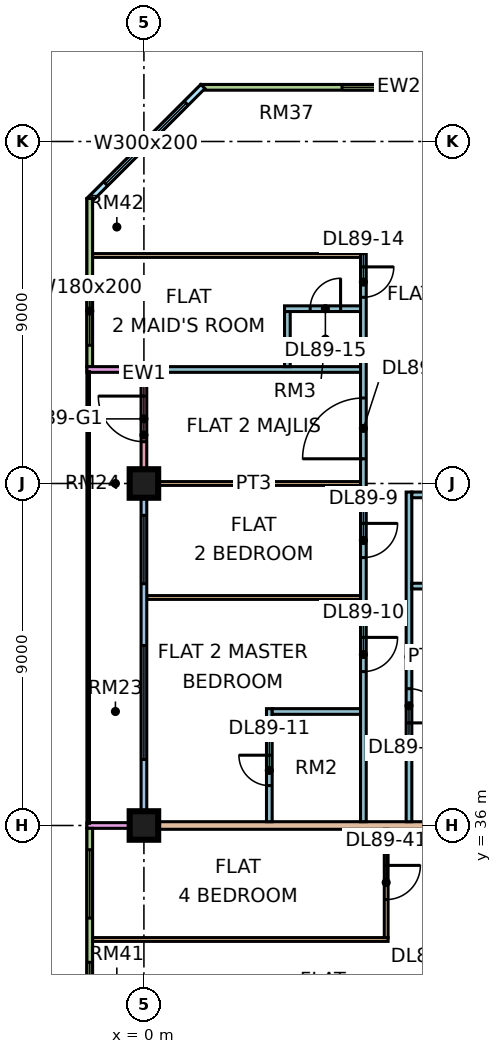
"""IFC4 building model, lengths in metres.
Left out: names, types, materials, properties, quantities, classifications, styles, units other than length and angle.
Written with IfcOpenShell. Run it as: python <this file> out.ifc"""

import sys

from ifc_helpers import new_model, si_unit, direction, frame, frame_2d, origin, origin_2d, place, context, subcontext, project, spatial, rectangle, extrude, element, fill, save


model = new_model("IFC4")
c1 = context("Model", 3, precision=1e-05, world=origin(), true_north=direction((0.0, 1.0)))
c2 = subcontext(c1, "Body", "Model", "MODEL_VIEW")
j1 = project(units=[si_unit("LENGTHUNIT", "METRE"), si_unit("PLANEANGLEUNIT", "RADIAN")], contexts=[c1])
p1 = place(None, origin())
s1 = spatial("IfcSite", under=j1, at=p1, CompositionType="ELEMENT")
p2 = place(p1, origin())
s2 = spatial("IfcBuilding", under=s1, at=p2, CompositionType="ELEMENT")
p3 = place(p2, frame((0.0, 0.0, 380.15)))
s3 = spatial("IfcBuildingStorey", under=s2, at=p3, CompositionType="ELEMENT", Elevation=380.15)
p4 = place(p3, frame((0.0, 36.0, 0.0), z_axis=(0.0, 0.0, 1.0), x_axis=(1.0, 0.0, 0.0)))
e1 = element("IfcColumn", 1, at=p4, inside=s3, PredefinedType="COLUMN", context=c2, shape_type="SweptSolid", body=[
    extrude(rectangle(XDim=0.75, YDim=0.75, at=origin_2d()), origin(), (0.0, 0.0, 1.0), 3.75),
])
p5 = place(p3, frame((0.0, 45.0, 0.0), z_axis=(0.0, 0.0, 1.0), x_axis=(1.0, 0.0, 0.0)))
e2 = element("IfcColumn", 2, at=p5, inside=s3, PredefinedType="COLUMN", context=c2, shape_type="SweptSolid", body=[
    extrude(rectangle(XDim=0.75, YDim=0.75, at=origin_2d()), origin(), (0.0, 0.0, 1.0), 3.75),
])
p6 = place(p3, frame((11.925, 55.425, 0.0), z_axis=(0.0, 0.0, 1.0), x_axis=(-1.0, 0.0, 0.0)))
e3 = element("IfcWall", 3, at=p6, inside=s3, PredefinedType="SOLIDWALL", context=c2, shape_type="SweptSolid", body=[
    extrude(rectangle(XDim=10.425, YDim=0.15, at=frame_2d((5.212, 0.0))), origin(), (0.0, 0.0, 1.0), 3.3),
])
p7 = place(p6, frame((3.712, 0.0, 0.45)))
e4 = element("IfcOpeningElement", 4, at=p7, cuts=e3, PredefinedType="OPENING", context=c2, shape_type="SweptSolid", body=[
    extrude(rectangle(XDim=3.0, YDim=2.0, at=frame_2d((1.5, 1.0))), frame((0.0, 0.085, 0.0), z_axis=(0.0, -1.0, 0.0), x_axis=(1.0, 0.0, 0.0)), (0.0, 0.0, 1.0), 0.17),
])
p8 = place(p3, frame((1.553, 55.447, 0.0), z_axis=(0.0, 0.0, 1.0), x_axis=(-0.707106781187, -0.707106781187, 0.0)))
e5 = element("IfcWall", 5, at=p8, inside=s3, PredefinedType="SOLIDWALL", context=c2, shape_type="SweptSolid", body=[
    extrude(rectangle(XDim=4.243, YDim=0.15, at=frame_2d((2.121, 0.0))), origin(), (0.0, 0.0, 1.0), 3.3),
])
p9 = place(p8, frame((0.621, 0.0, 0.45)))
e6 = element("IfcOpeningElement", 6, at=p9, cuts=e5, PredefinedType="OPENING", context=c2, shape_type="SweptSolid", body=[
    extrude(rectangle(XDim=3.0, YDim=2.0, at=frame_2d((1.5, 1.0))), frame((0.0, 0.085, 0.0), z_axis=(0.0, -1.0, 0.0), x_axis=(1.0, 0.0, 0.0)), (0.0, 0.0, 1.0), 0.17),
])
p10 = place(p3, frame((-1.425, 52.5, 0.0), z_axis=(0.0, 0.0, 1.0), x_axis=(0.0, -1.0, 0.0)))
e7 = element("IfcWall", 7, at=p10, inside=s3, PredefinedType="SOLIDWALL", context=c2, shape_type="SweptSolid", body=[
    extrude(rectangle(XDim=4.425, YDim=0.15, at=frame_2d((2.212, 0.0))), origin(), (0.0, 0.0, 1.0), 3.3),
])
p11 = place(p10, frame((2.062, 0.0, 0.45)))
e8 = element("IfcOpeningElement", 8, at=p11, cuts=e7, PredefinedType="OPENING", context=c2, shape_type="SweptSolid", body=[
    extrude(rectangle(XDim=1.8, YDim=2.0, at=frame_2d((0.9, 1.0))), frame((0.0, 0.085, 0.0), z_axis=(0.0, -1.0, 0.0), x_axis=(1.0, 0.0, 0.0)), (0.0, 0.0, 1.0), 0.17),
])
for number, where, z_axis, x_axis in (
    (9, (-1.5, 48.0, 0.0), (0.0, 0.0, 1.0), (1.0, 0.0, 0.0)),
    (10, (-1.5, 36.0, 0.0), (0.0, 0.0, 1.0), (1.0, 0.0, 0.0)),
):
    element("IfcWall", number, at=place(p3, frame(where, z_axis=z_axis, x_axis=x_axis)), inside=s3, PredefinedType="SOLIDWALL", context=c2, shape_type="SweptSolid", body=[
        extrude(rectangle(XDim=1.5, YDim=0.15, at=frame_2d((0.75, 0.0))), origin(), (0.0, 0.0, 1.0), 3.3),
    ])
p12 = place(p3, frame((-1.425, 35.925, 0.0), z_axis=(0.0, 0.0, 1.0), x_axis=(0.0, -1.0, 0.0)))
e11 = element("IfcWall", 11, at=p12, inside=s3, PredefinedType="SOLIDWALL", context=c2, shape_type="SweptSolid", body=[
    extrude(rectangle(XDim=11.85, YDim=0.15, at=frame_2d((5.925, 0.0))), origin(), (0.0, 0.0, 1.0), 3.3),
])
p13 = place(p12, frame((0.562, 0.0, 0.45)))
e12 = element("IfcOpeningElement", 12, at=p13, cuts=e11, PredefinedType="OPENING", context=c2, shape_type="SweptSolid", body=[
    extrude(rectangle(XDim=1.8, YDim=2.0, at=frame_2d((0.9, 1.0))), frame((0.0, 0.085, 0.0), z_axis=(0.0, -1.0, 0.0), x_axis=(1.0, 0.0, 0.0)), (0.0, 0.0, 1.0), 0.17),
])
p14 = place(p12, frame((3.525, 0.0, 0.45)))
e13 = element("IfcOpeningElement", 13, at=p14, cuts=e11, PredefinedType="OPENING", context=c2, shape_type="SweptSolid", body=[
    extrude(rectangle(XDim=1.8, YDim=2.0, at=frame_2d((0.9, 1.0))), frame((0.0, 0.085, 0.0), z_axis=(0.0, -1.0, 0.0), x_axis=(1.0, 0.0, 0.0)), (0.0, 0.0, 1.0), 0.17),
])
p15 = place(p12, frame((6.525, 0.0, 0.45)))
e14 = element("IfcOpeningElement", 14, at=p15, cuts=e11, PredefinedType="OPENING", context=c2, shape_type="SweptSolid", body=[
    extrude(rectangle(XDim=1.8, YDim=2.0, at=frame_2d((0.9, 1.0))), frame((0.0, 0.085, 0.0), z_axis=(0.0, -1.0, 0.0), x_axis=(1.0, 0.0, 0.0)), (0.0, 0.0, 1.0), 0.17),
])
p16 = place(p12, frame((9.488, 0.0, 0.45)))
e15 = element("IfcOpeningElement", 15, at=p16, cuts=e11, PredefinedType="OPENING", context=c2, shape_type="SweptSolid", body=[
    extrude(rectangle(XDim=1.8, YDim=2.0, at=frame_2d((0.9, 1.0))), frame((0.0, 0.085, 0.0), z_axis=(0.0, -1.0, 0.0), x_axis=(1.0, 0.0, 0.0)), (0.0, 0.0, 1.0), 0.17),
])
p17 = place(p3, frame((-1.35, 33.0, 0.0), z_axis=(0.0, 0.0, 1.0), x_axis=(1.0, 0.0, 0.0)))
e16 = element("IfcWall", 16, at=p17, inside=s3, PredefinedType="PARTITIONING", context=c2, shape_type="SweptSolid", body=[
    extrude(rectangle(XDim=7.775, YDim=0.1, at=frame_2d((3.888, 0.0))), origin(), (0.0, 0.0, 1.0), 3.3),
])
e17 = element("IfcWall", 17, at=p4, inside=s3, PredefinedType="PARTITIONING", context=c2, shape_type="SweptSolid", body=[
    extrude(rectangle(XDim=12.275, YDim=0.2, at=frame_2d((6.137, 0.0))), origin(), (0.0, 0.0, 1.0), 3.3),
])
p18 = place(p3, frame((0.0, 48.0, 0.0), z_axis=(0.0, 0.0, 1.0), x_axis=(1.0, 0.0, 0.0)))
e18 = element("IfcWall", 18, at=p18, inside=s3, PredefinedType="PARTITIONING", context=c2, shape_type="SweptSolid", body=[
    extrude(rectangle(XDim=5.7, YDim=0.15, at=frame_2d((2.85, 0.0))), origin(), (0.0, 0.0, 1.0), 3.3),
])
p19 = place(p3, frame((-1.35, 51.0, 0.0), z_axis=(0.0, 0.0, 1.0), x_axis=(1.0, 0.0, 0.0)))
e19 = element("IfcWall", 19, at=p19, inside=s3, PredefinedType="PARTITIONING", context=c2, shape_type="SweptSolid", body=[
    extrude(rectangle(XDim=7.05, YDim=0.1, at=frame_2d((3.525, 0.0))), origin(), (0.0, 0.0, 1.0), 3.3),
])
for number, where, z_axis, x_axis in (
    (20, (0.074, 42.0, 0.0), (0.0, 0.0, 1.0), (1.0, 0.0, 0.0)),
    (21, (0.074, 45.0, 0.0), (0.0, 0.0, 1.0), (1.0, 0.0, 0.0)),
):
    element("IfcWall", number, at=place(p3, frame(where, z_axis=z_axis, x_axis=x_axis)), inside=s3, PredefinedType="PARTITIONING", context=c2, shape_type="SweptSolid", body=[
        extrude(rectangle(XDim=5.626, YDim=0.1, at=frame_2d((2.813, 0.0))), origin(), (0.0, 0.0, 1.0), 3.3),
    ])
p20 = place(p3, frame((3.3, 36.1, 0.0), z_axis=(0.0, 0.0, 1.0), x_axis=(0.0, 1.0, 0.0)))
e22 = element("IfcWall", 22, at=p20, inside=s3, PredefinedType="PARTITIONING", context=c2, shape_type="SweptSolid", body=[
    extrude(rectangle(XDim=2.975, YDim=0.15, at=frame_2d((1.487, 0.0))), origin(), (0.0, 0.0, 1.0), 3.3),
])
p21 = place(p20, frame((0.95, 0.0, 0.0)))
e23 = element("IfcOpeningElement", 23, at=p21, cuts=e22, PredefinedType="OPENING", context=c2, shape_type="SweptSolid", body=[
    extrude(rectangle(XDim=0.8, YDim=2.1, at=frame_2d((0.4, 1.05))), frame((0.0, 0.085, 0.0), z_axis=(0.0, -1.0, 0.0), x_axis=(1.0, 0.0, 0.0)), (0.0, 0.0, 1.0), 0.17),
])
p22 = place(p3, frame((3.375, 39.0, 0.0), z_axis=(0.0, 0.0, 1.0), x_axis=(1.0, 0.0, 0.0)))
e24 = element("IfcWall", 24, at=p22, inside=s3, PredefinedType="PARTITIONING", context=c2, shape_type="SweptSolid", body=[
    extrude(rectangle(XDim=2.325, YDim=0.15, at=frame_2d((1.163, 0.0))), origin(), (0.0, 0.0, 1.0), 3.3),
])
p23 = place(p3, frame((3.7, 49.6, 0.0), z_axis=(0.0, 0.0, 1.0), x_axis=(1.0, 0.0, 0.0)))
e25 = element("IfcWall", 25, at=p23, inside=s3, PredefinedType="PARTITIONING", context=c2, shape_type="SweptSolid", body=[
    extrude(rectangle(XDim=2.0, YDim=0.15, at=frame_2d((1.0, 0.0))), origin(), (0.0, 0.0, 1.0), 3.3),
])
p24 = place(p23, frame((0.675, 0.0, 0.0)))
e26 = element("IfcOpeningElement", 26, at=p24, cuts=e25, PredefinedType="OPENING", context=c2, shape_type="SweptSolid", body=[
    extrude(rectangle(XDim=0.8, YDim=2.1, at=frame_2d((0.4, 1.05))), frame((0.0, 0.085, 0.0), z_axis=(0.0, -1.0, 0.0), x_axis=(1.0, 0.0, 0.0)), (0.0, 0.0, 1.0), 0.17),
])
p25 = place(p3, frame((3.775, 48.075, 0.0), z_axis=(0.0, 0.0, 1.0), x_axis=(0.0, 1.0, 0.0)))
e27 = element("IfcWall", 27, at=p25, inside=s3, PredefinedType="PARTITIONING", context=c2, shape_type="SweptSolid", body=[
    extrude(rectangle(XDim=1.45, YDim=0.15, at=frame_2d((0.725, 0.0))), origin(), (0.0, 0.0, 1.0), 3.3),
])
p26 = place(p3, frame((5.775, 36.1, 0.0), z_axis=(0.0, 0.0, 1.0), x_axis=(0.0, 1.0, 0.0)))
e28 = element("IfcWall", 28, at=p26, inside=s3, PredefinedType="PARTITIONING", context=c2, shape_type="SweptSolid", body=[
    extrude(rectangle(XDim=14.95, YDim=0.15, at=frame_2d((7.475, 0.0))), origin(), (0.0, 0.0, 1.0), 3.3),
])
p27 = place(p26, frame((6.95, 0.0, 0.0)))
e29 = element("IfcOpeningElement", 29, at=p27, cuts=e28, PredefinedType="OPENING", context=c2, shape_type="SweptSolid", body=[
    extrude(rectangle(XDim=0.9, YDim=2.1, at=frame_2d((0.45, 1.05))), frame((0.0, 0.085, 0.0), z_axis=(0.0, -1.0, 0.0), x_axis=(1.0, 0.0, 0.0)), (0.0, 0.0, 1.0), 0.17),
])
p28 = place(p26, frame((3.95, 0.0, 0.0)))
e30 = element("IfcOpeningElement", 30, at=p28, cuts=e28, PredefinedType="OPENING", context=c2, shape_type="SweptSolid", body=[
    extrude(rectangle(XDim=0.9, YDim=2.1, at=frame_2d((0.45, 1.05))), frame((0.0, 0.085, 0.0), z_axis=(0.0, -1.0, 0.0), x_axis=(1.0, 0.0, 0.0)), (0.0, 0.0, 1.0), 0.17),
])
p29 = place(p26, frame((13.8, 0.0, 0.0)))
e31 = element("IfcOpeningElement", 31, at=p29, cuts=e28, PredefinedType="OPENING", context=c2, shape_type="SweptSolid", body=[
    extrude(rectangle(XDim=0.8, YDim=2.1, at=frame_2d((0.4, 1.05))), frame((0.0, 0.085, 0.0), z_axis=(0.0, -1.0, 0.0), x_axis=(1.0, 0.0, 0.0)), (0.0, 0.0, 1.0), 0.17),
])
p30 = place(p26, frame((9.55, 0.0, 0.0)))
e32 = element("IfcOpeningElement", 32, at=p30, cuts=e28, PredefinedType="OPENING", context=c2, shape_type="SweptSolid", body=[
    extrude(rectangle(XDim=1.6, YDim=2.1, at=frame_2d((0.8, 1.05))), frame((0.0, 0.085, 0.0), z_axis=(0.0, -1.0, 0.0), x_axis=(1.0, 0.0, 0.0)), (0.0, 0.0, 1.0), 0.17),
])
p31 = place(p3, frame((6.375, 33.05, 0.0), z_axis=(0.0, 0.0, 1.0), x_axis=(0.0, 1.0, 0.0)))
e33 = element("IfcWall", 33, at=p31, inside=s3, PredefinedType="PARTITIONING", context=c2, shape_type="SweptSolid", body=[
    extrude(rectangle(XDim=2.85, YDim=0.1, at=frame_2d((1.425, 0.0))), origin(), (0.0, 0.0, 1.0), 3.3),
])
p32 = place(p31, frame((1.0, 0.0, 0.0)))
e34 = element("IfcOpeningElement", 34, at=p32, cuts=e33, PredefinedType="OPENING", context=c2, shape_type="SweptSolid", body=[
    extrude(rectangle(XDim=0.9, YDim=2.1, at=frame_2d((0.45, 1.05))), frame((0.0, 0.06, 0.0), z_axis=(0.0, -1.0, 0.0), x_axis=(1.0, 0.0, 0.0)), (0.0, 0.0, 1.0), 0.12),
])
p33 = place(p3, frame((6.975, 36.1, 0.0), z_axis=(0.0, 0.0, 1.0), x_axis=(0.0, 1.0, 0.0)))
e35 = element("IfcWall", 35, at=p33, inside=s3, PredefinedType="PARTITIONING", context=c2, shape_type="SweptSolid", body=[
    extrude(rectangle(XDim=8.675, YDim=0.15, at=frame_2d((4.337, 0.0))), origin(), (0.0, 0.0, 1.0), 3.3),
])
p34 = place(p33, frame((2.6, 0.0, 0.0)))
e36 = element("IfcOpeningElement", 36, at=p34, cuts=e35, PredefinedType="OPENING", context=c2, shape_type="SweptSolid", body=[
    extrude(rectangle(XDim=0.9, YDim=2.1, at=frame_2d((0.45, 1.05))), frame((0.0, 0.085, 0.0), z_axis=(0.0, -1.0, 0.0), x_axis=(1.0, 0.0, 0.0)), (0.0, 0.0, 1.0), 0.17),
])
p35 = place(p3, frame((7.05, 42.3, 0.0), z_axis=(0.0, 0.0, 1.0), x_axis=(1.0, 0.0, 0.0)))
e37 = element("IfcWall", 37, at=p35, inside=s3, PredefinedType="PARTITIONING", context=c2, shape_type="SweptSolid", body=[
    extrude(rectangle(XDim=5.225, YDim=0.15, at=frame_2d((2.612, 0.0))), origin(), (0.0, 0.0, 1.0), 3.3),
])
p36 = place(p3, frame((7.05, 44.7, 0.0), z_axis=(0.0, 0.0, 1.0), x_axis=(1.0, 0.0, 0.0)))
e38 = element("IfcWall", 38, at=p36, inside=s3, PredefinedType="PARTITIONING", context=c2, shape_type="SweptSolid", body=[
    extrude(rectangle(XDim=5.225, YDim=0.15, at=frame_2d((2.612, 0.0))), origin(), (0.0, 0.0, 1.0), 3.3),
])
p37 = place(p36, frame((2.175, 0.0, 0.0)))
e39 = element("IfcOpeningElement", 39, at=p37, cuts=e38, PredefinedType="OPENING", context=c2, shape_type="SweptSolid", body=[
    extrude(rectangle(XDim=0.8, YDim=2.1, at=frame_2d((0.4, 1.05))), frame((0.0, 0.085, 0.0), z_axis=(0.0, -1.0, 0.0), x_axis=(1.0, 0.0, 0.0)), (0.0, 0.0, 1.0), 0.17),
])
p38 = place(p3, frame((0.0, 47.925, 0.0), z_axis=(0.0, 0.0, 1.0), x_axis=(0.0, -1.0, 0.0)))
e40 = element("IfcWall", 40, at=p38, inside=s3, PredefinedType="SOLIDWALL", context=c2, shape_type="SweptSolid", body=[
    extrude(rectangle(XDim=3.3, YDim=0.15, at=frame_2d((1.65, 0.0))), origin(), (0.0, 0.0, 1.0), 3.3),
])
p39 = place(p38, frame((0.625, 0.0, 0.0)))
e41 = element("IfcOpeningElement", 41, at=p39, cuts=e40, PredefinedType="OPENING", context=c2, shape_type="SweptSolid", body=[
    extrude(rectangle(XDim=1.2, YDim=2.4, at=frame_2d((0.6, 1.2))), frame((0.0, 0.085, 0.0), z_axis=(0.0, -1.0, 0.0), x_axis=(1.0, 0.0, 0.0)), (0.0, 0.0, 1.0), 0.17),
])
p40 = place(p3, frame((0.0, 44.625, 0.0), z_axis=(0.0, 0.0, 1.0), x_axis=(0.0, -1.0, 0.0)))
e42 = element("IfcWall", 42, at=p40, inside=s3, PredefinedType="SOLIDWALL", context=c2, shape_type="SweptSolid", body=[
    extrude(rectangle(XDim=8.25, YDim=0.15, at=frame_2d((4.125, 0.0))), origin(), (0.0, 0.0, 1.0), 2.8),
])
p41 = place(p40, frame((0.462, 0.0, 0.45)))
e43 = element("IfcOpeningElement", 43, at=p41, cuts=e42, PredefinedType="OPENING", context=c2, shape_type="SweptSolid", body=[
    extrude(rectangle(XDim=1.8, YDim=2.0, at=frame_2d((0.9, 1.0))), frame((0.0, 0.085, 0.0), z_axis=(0.0, -1.0, 0.0), x_axis=(1.0, 0.0, 0.0)), (0.0, 0.0, 1.0), 0.17),
])
p42 = place(p40, frame((3.887, 0.0, 0.45)))
e44 = element("IfcOpeningElement", 44, at=p42, cuts=e42, PredefinedType="OPENING", context=c2, shape_type="SweptSolid", body=[
    extrude(rectangle(XDim=3.0, YDim=2.0, at=frame_2d((1.5, 1.0))), frame((0.0, 0.085, 0.0), z_axis=(0.0, -1.0, 0.0), x_axis=(1.0, 0.0, 0.0)), (0.0, 0.0, 1.0), 0.17),
])
p43 = place(p3, frame((0.0, 36.375, 0.0), z_axis=(0.0, 0.0, 1.0), x_axis=(0.0, -1.0, 0.0)))
e45 = element("IfcWall", 45, at=p43, inside=s3, PredefinedType="SOLIDWALL", context=c2, shape_type="SweptSolid", body=[
    extrude(rectangle(XDim=0.3, YDim=0.15, at=frame_2d((0.15, 0.0))), origin(), (0.0, 0.0, 1.0), 3.3),
])
p44 = place(p7, origin())
e46 = element("IfcWindow", 46, at=p44, inside=s3, PartitioningType="SINGLE_PANEL", PredefinedType="WINDOW", context=c2, shape_type="SweptSolid", body=[
    extrude(rectangle(XDim=3.0, YDim=2.0, at=frame_2d((1.5, 1.0))), frame((0.0, 0.03, 0.0), z_axis=(0.0, -1.0, 0.0), x_axis=(1.0, 0.0, 0.0)), (0.0, 0.0, 1.0), 0.06),
])
fill(e4, e46)
p45 = place(p9, origin())
e47 = element("IfcWindow", 47, at=p45, inside=s3, PartitioningType="SINGLE_PANEL", PredefinedType="WINDOW", context=c2, shape_type="SweptSolid", body=[
    extrude(rectangle(XDim=3.0, YDim=2.0, at=frame_2d((1.5, 1.0))), frame((0.0, 0.03, 0.0), z_axis=(0.0, -1.0, 0.0), x_axis=(1.0, 0.0, 0.0)), (0.0, 0.0, 1.0), 0.06),
])
fill(e6, e47)
p46 = place(p11, origin())
e48 = element("IfcWindow", 48, at=p46, inside=s3, PartitioningType="SINGLE_PANEL", PredefinedType="WINDOW", context=c2, shape_type="SweptSolid", body=[
    extrude(rectangle(XDim=1.8, YDim=2.0, at=frame_2d((0.9, 1.0))), frame((0.0, 0.03, 0.0), z_axis=(0.0, -1.0, 0.0), x_axis=(1.0, 0.0, 0.0)), (0.0, 0.0, 1.0), 0.06),
])
fill(e8, e48)
p47 = place(p39, frame((1.2, 0.0, 0.0), z_axis=(0.0, 0.0, 1.0), x_axis=(-1.0, 0.0, 0.0)))
e49 = element("IfcDoor", 49, at=p47, inside=s3, OperationType="DOUBLE_DOOR_SINGLE_SWING", PredefinedType="DOOR", context=c2, shape_type="SweptSolid", body=[
    extrude(rectangle(XDim=1.2, YDim=2.4, at=frame_2d((0.6, 1.2))), frame((0.0, 0.025, 0.0), z_axis=(0.0, -1.0, 0.0), x_axis=(1.0, 0.0, 0.0)), (0.0, 0.0, 1.0), 0.05),
])
fill(e41, e49)
p48 = place(p41, origin())
e50 = element("IfcWindow", 50, at=p48, inside=s3, PartitioningType="SINGLE_PANEL", PredefinedType="WINDOW", context=c2, shape_type="SweptSolid", body=[
    extrude(rectangle(XDim=1.8, YDim=2.0, at=frame_2d((0.9, 1.0))), frame((0.0, 0.03, 0.0), z_axis=(0.0, -1.0, 0.0), x_axis=(1.0, 0.0, 0.0)), (0.0, 0.0, 1.0), 0.06),
])
fill(e43, e50)
p49 = place(p42, origin())
e51 = element("IfcWindow", 51, at=p49, inside=s3, PartitioningType="SINGLE_PANEL", PredefinedType="WINDOW", context=c2, shape_type="SweptSolid", body=[
    extrude(rectangle(XDim=3.0, YDim=2.0, at=frame_2d((1.5, 1.0))), frame((0.0, 0.03, 0.0), z_axis=(0.0, -1.0, 0.0), x_axis=(1.0, 0.0, 0.0)), (0.0, 0.0, 1.0), 0.06),
])
fill(e44, e51)
p50 = place(p13, origin())
e52 = element("IfcWindow", 52, at=p50, inside=s3, PartitioningType="SINGLE_PANEL", PredefinedType="WINDOW", context=c2, shape_type="SweptSolid", body=[
    extrude(rectangle(XDim=1.8, YDim=2.0, at=frame_2d((0.9, 1.0))), frame((0.0, 0.03, 0.0), z_axis=(0.0, -1.0, 0.0), x_axis=(1.0, 0.0, 0.0)), (0.0, 0.0, 1.0), 0.06),
])
fill(e12, e52)
p51 = place(p14, origin())
e53 = element("IfcWindow", 53, at=p51, inside=s3, PartitioningType="SINGLE_PANEL", PredefinedType="WINDOW", context=c2, shape_type="SweptSolid", body=[
    extrude(rectangle(XDim=1.8, YDim=2.0, at=frame_2d((0.9, 1.0))), frame((0.0, 0.03, 0.0), z_axis=(0.0, -1.0, 0.0), x_axis=(1.0, 0.0, 0.0)), (0.0, 0.0, 1.0), 0.06),
])
fill(e13, e53)
p52 = place(p27, origin())
e54 = element("IfcDoor", 54, at=p52, inside=s3, OperationType="SINGLE_SWING_RIGHT", PredefinedType="DOOR", context=c2, shape_type="SweptSolid", body=[
    extrude(rectangle(XDim=0.9, YDim=2.1, at=frame_2d((0.45, 1.05))), frame((0.0, 0.025, 0.0), z_axis=(0.0, -1.0, 0.0), x_axis=(1.0, 0.0, 0.0)), (0.0, 0.0, 1.0), 0.05),
])
fill(e29, e54)
p53 = place(p28, origin())
e55 = element("IfcDoor", 55, at=p53, inside=s3, OperationType="SINGLE_SWING_RIGHT", PredefinedType="DOOR", context=c2, shape_type="SweptSolid", body=[
    extrude(rectangle(XDim=0.9, YDim=2.1, at=frame_2d((0.45, 1.05))), frame((0.0, 0.025, 0.0), z_axis=(0.0, -1.0, 0.0), x_axis=(1.0, 0.0, 0.0)), (0.0, 0.0, 1.0), 0.05),
])
fill(e30, e55)
p54 = place(p21, frame((0.8, 0.0, 0.0), z_axis=(0.0, 0.0, 1.0), x_axis=(-1.0, 0.0, 0.0)))
e56 = element("IfcDoor", 56, at=p54, inside=s3, OperationType="SINGLE_SWING_RIGHT", PredefinedType="DOOR", context=c2, shape_type="SweptSolid", body=[
    extrude(rectangle(XDim=0.8, YDim=2.1, at=frame_2d((0.4, 1.05))), frame((0.0, 0.025, 0.0), z_axis=(0.0, -1.0, 0.0), x_axis=(1.0, 0.0, 0.0)), (0.0, 0.0, 1.0), 0.05),
])
fill(e23, e56)
p55 = place(p34, frame((0.9, 0.0, 0.0), z_axis=(0.0, 0.0, 1.0), x_axis=(-1.0, 0.0, 0.0)))
e57 = element("IfcDoor", 57, at=p55, inside=s3, OperationType="SINGLE_SWING_LEFT", PredefinedType="DOOR", context=c2, shape_type="SweptSolid", body=[
    extrude(rectangle(XDim=0.9, YDim=2.1, at=frame_2d((0.45, 1.05))), frame((0.0, 0.025, 0.0), z_axis=(0.0, -1.0, 0.0), x_axis=(1.0, 0.0, 0.0)), (0.0, 0.0, 1.0), 0.05),
])
fill(e36, e57)
p56 = place(p29, origin())
e58 = element("IfcDoor", 58, at=p56, inside=s3, OperationType="SINGLE_SWING_RIGHT", PredefinedType="DOOR", context=c2, shape_type="SweptSolid", body=[
    extrude(rectangle(XDim=0.8, YDim=2.1, at=frame_2d((0.4, 1.05))), frame((0.0, 0.025, 0.0), z_axis=(0.0, -1.0, 0.0), x_axis=(1.0, 0.0, 0.0)), (0.0, 0.0, 1.0), 0.05),
])
fill(e31, e58)
p57 = place(p24, frame((0.8, 0.0, 0.0), z_axis=(0.0, 0.0, 1.0), x_axis=(-1.0, 0.0, 0.0)))
e59 = element("IfcDoor", 59, at=p57, inside=s3, OperationType="SINGLE_SWING_RIGHT", PredefinedType="DOOR", context=c2, shape_type="SweptSolid", body=[
    extrude(rectangle(XDim=0.8, YDim=2.1, at=frame_2d((0.4, 1.05))), frame((0.0, 0.025, 0.0), z_axis=(0.0, -1.0, 0.0), x_axis=(1.0, 0.0, 0.0)), (0.0, 0.0, 1.0), 0.05),
])
fill(e26, e59)
p58 = place(p30, origin())
e60 = element("IfcDoor", 60, at=p58, inside=s3, OperationType="DOUBLE_DOOR_SINGLE_SWING", PredefinedType="DOOR", context=c2, shape_type="SweptSolid", body=[
    extrude(rectangle(XDim=1.6, YDim=2.1, at=frame_2d((0.8, 1.05))), frame((0.0, 0.025, 0.0), z_axis=(0.0, -1.0, 0.0), x_axis=(1.0, 0.0, 0.0)), (0.0, 0.0, 1.0), 0.05),
])
fill(e32, e60)
p59 = place(p32, origin())
e61 = element("IfcDoor", 61, at=p59, inside=s3, OperationType="SINGLE_SWING_RIGHT", PredefinedType="DOOR", context=c2, shape_type="SweptSolid", body=[
    extrude(rectangle(XDim=0.9, YDim=2.1, at=frame_2d((0.45, 1.05))), frame((0.0, 0.025, 0.0), z_axis=(0.0, -1.0, 0.0), x_axis=(1.0, 0.0, 0.0)), (0.0, 0.0, 1.0), 0.05),
])
fill(e34, e61)
save(model, sys.argv[1])
